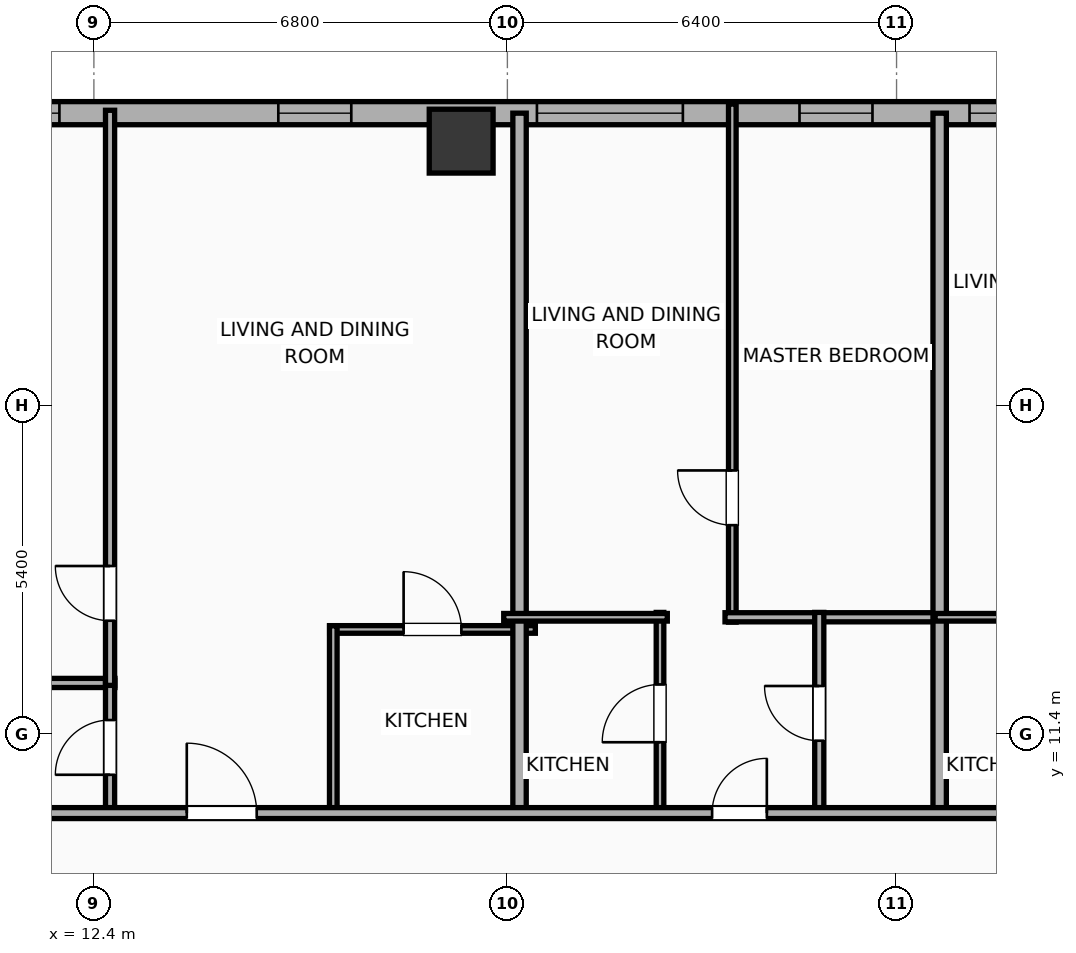
"""IFC4 building model, lengths in metres.
Left out: names, types, materials, properties, quantities, classifications, styles, units other than length and angle.
Written with IfcOpenShell. Run it as: python <this file> out.ifc"""

import sys

from ifc_helpers import new_model, si_unit, direction, frame, frame_2d, origin, origin_2d, place, context, subcontext, project, spatial, rectangle, hollow_rectangle, extrude, element, fill, save


model = new_model("IFC4")
c1 = context("Model", 3, precision=1e-05, world=origin(), true_north=direction((0.0, 1.0)))
c2 = subcontext(c1, "Body", "Model", "MODEL_VIEW")
j1 = project(units=[si_unit("LENGTHUNIT", "METRE"), si_unit("PLANEANGLEUNIT", "RADIAN")], contexts=[c1])
p1 = place(None, origin())
s1 = spatial("IfcSite", under=j1, at=p1, CompositionType="ELEMENT")
p2 = place(p1, origin())
s2 = spatial("IfcBuilding", under=s1, at=p2, CompositionType="ELEMENT")
p3 = place(p2, frame((0.0, 0.0, 97.5)))
s3 = spatial("IfcBuildingStorey", under=s2, at=p3, CompositionType="ELEMENT", Elevation=97.5)
p4 = place(p3, frame((18.44, 21.15, 0.0), z_axis=(0.0, 0.0, 1.0), x_axis=(1.0, 0.0, 0.0)))
e1 = element("IfcColumn", 1, at=p4, inside=s3, PredefinedType="COLUMN", context=c2, shape_type="SweptSolid", body=[
    extrude(hollow_rectangle(XDim=1.05, YDim=1.05, WallThickness=0.036, at=origin_2d()), origin(), (0.0, 0.0, 1.0), 3.9),
])
p5 = place(p3, frame((-25.381, 21.61, 0.0), z_axis=(0.0, 0.0, 1.0), x_axis=(1.0, 0.0, 0.0)))
e2 = element("IfcWall", 2, at=p5, inside=s3, PredefinedType="ELEMENTEDWALL", context=c2, shape_type="SweptSolid", body=[
    extrude(rectangle(XDim=54.763, YDim=0.38, at=frame_2d((27.381, 0.0))), origin(), (0.0, 0.0, 1.0), 3.65),
])
p6 = place(p5, frame((45.067, 0.0, 0.75)))
e3 = element("IfcOpeningElement", 3, at=p6, cuts=e2, PredefinedType="OPENING", context=c2, shape_type="SweptSolid", body=[
    extrude(rectangle(XDim=2.4, YDim=2.1, at=frame_2d((1.2, 1.05))), frame((0.0, 0.2, 0.0), z_axis=(0.0, -1.0, 0.0), x_axis=(1.0, 0.0, 0.0)), (0.0, 0.0, 1.0), 0.4),
])
p7 = place(p5, frame((4.076, 0.0, 0.75)))
e4 = element("IfcOpeningElement", 4, at=p7, cuts=e2, PredefinedType="OPENING", context=c2, shape_type="SweptSolid", body=[
    extrude(rectangle(XDim=1.2, YDim=2.05, at=frame_2d((0.6, 1.025))), frame((0.0, 0.2, 0.0), z_axis=(0.0, -1.0, 0.0), x_axis=(1.0, 0.0, 0.0)), (0.0, 0.0, 1.0), 0.4),
])
p8 = place(p5, frame((9.395, 0.0, 0.75)))
e5 = element("IfcOpeningElement", 5, at=p8, cuts=e2, PredefinedType="OPENING", context=c2, shape_type="SweptSolid", body=[
    extrude(rectangle(XDim=0.85, YDim=2.05, at=frame_2d((0.425, 1.025))), frame((0.0, 0.2, 0.0), z_axis=(0.0, -1.0, 0.0), x_axis=(1.0, 0.0, 0.0)), (0.0, 0.0, 1.0), 0.4),
])
p9 = place(p5, frame((7.205, 0.0, 0.75)))
e6 = element("IfcOpeningElement", 6, at=p9, cuts=e2, PredefinedType="OPENING", context=c2, shape_type="SweptSolid", body=[
    extrude(rectangle(XDim=1.2, YDim=2.05, at=frame_2d((0.6, 1.025))), frame((0.0, 0.2, 0.0), z_axis=(0.0, -1.0, 0.0), x_axis=(1.0, 0.0, 0.0)), (0.0, 0.0, 1.0), 0.4),
])
p10 = place(p5, frame((13.676, 0.0, 0.75)))
e7 = element("IfcOpeningElement", 7, at=p10, cuts=e2, PredefinedType="OPENING", context=c2, shape_type="SweptSolid", body=[
    extrude(rectangle(XDim=1.2, YDim=2.05, at=frame_2d((0.6, 1.025))), frame((0.0, 0.2, 0.0), z_axis=(0.0, -1.0, 0.0), x_axis=(1.0, 0.0, 0.0)), (0.0, 0.0, 1.0), 0.4),
])
p11 = place(p5, frame((17.136, 0.0, 0.75)))
e8 = element("IfcOpeningElement", 8, at=p11, cuts=e2, PredefinedType="OPENING", context=c2, shape_type="SweptSolid", body=[
    extrude(rectangle(XDim=1.2, YDim=2.05, at=frame_2d((0.6, 1.025))), frame((0.0, 0.2, 0.0), z_axis=(0.0, -1.0, 0.0), x_axis=(1.0, 0.0, 0.0)), (0.0, 0.0, 1.0), 0.4),
])
p12 = place(p5, frame((22.656, 0.0, 0.75)))
e9 = element("IfcOpeningElement", 9, at=p12, cuts=e2, PredefinedType="OPENING", context=c2, shape_type="SweptSolid", body=[
    extrude(rectangle(XDim=1.2, YDim=2.05, at=frame_2d((0.6, 1.025))), frame((0.0, 0.2, 0.0), z_axis=(0.0, -1.0, 0.0), x_axis=(1.0, 0.0, 0.0)), (0.0, 0.0, 1.0), 0.4),
])
p13 = place(p5, frame((29.443, 0.0, 0.75)))
e10 = element("IfcOpeningElement", 10, at=p13, cuts=e2, PredefinedType="OPENING", context=c2, shape_type="SweptSolid", body=[
    extrude(rectangle(XDim=1.2, YDim=2.05, at=frame_2d((0.6, 1.025))), frame((0.0, 0.2, 0.0), z_axis=(0.0, -1.0, 0.0), x_axis=(1.0, 0.0, 0.0)), (0.0, 0.0, 1.0), 0.4),
])
p14 = place(p5, frame((26.348, 0.0, 0.75)))
e11 = element("IfcOpeningElement", 11, at=p14, cuts=e2, PredefinedType="OPENING", context=c2, shape_type="SweptSolid", body=[
    extrude(rectangle(XDim=1.2, YDim=2.05, at=frame_2d((0.6, 1.025))), frame((0.0, 0.2, 0.0), z_axis=(0.0, -1.0, 0.0), x_axis=(1.0, 0.0, 0.0)), (0.0, 0.0, 1.0), 0.4),
])
p15 = place(p5, frame((33.596, 0.0, 0.75)))
e12 = element("IfcOpeningElement", 12, at=p15, cuts=e2, PredefinedType="OPENING", context=c2, shape_type="SweptSolid", body=[
    extrude(rectangle(XDim=1.2, YDim=2.05, at=frame_2d((0.6, 1.025))), frame((0.0, 0.2, 0.0), z_axis=(0.0, -1.0, 0.0), x_axis=(1.0, 0.0, 0.0)), (0.0, 0.0, 1.0), 0.4),
])
p16 = place(p5, frame((36.014, 0.0, 0.75)))
e13 = element("IfcOpeningElement", 13, at=p16, cuts=e2, PredefinedType="OPENING", context=c2, shape_type="SweptSolid", body=[
    extrude(rectangle(XDim=1.2, YDim=2.05, at=frame_2d((0.6, 1.025))), frame((0.0, 0.2, 0.0), z_axis=(0.0, -1.0, 0.0), x_axis=(1.0, 0.0, 0.0)), (0.0, 0.0, 1.0), 0.4),
])
p17 = place(p5, frame((40.814, 0.0, 0.75)))
e14 = element("IfcOpeningElement", 14, at=p17, cuts=e2, PredefinedType="OPENING", context=c2, shape_type="SweptSolid", body=[
    extrude(rectangle(XDim=1.2, YDim=2.05, at=frame_2d((0.6, 1.025))), frame((0.0, 0.2, 0.0), z_axis=(0.0, -1.0, 0.0), x_axis=(1.0, 0.0, 0.0)), (0.0, 0.0, 1.0), 0.4),
])
p18 = place(p5, frame((49.385, 0.0, 0.75)))
e15 = element("IfcOpeningElement", 15, at=p18, cuts=e2, PredefinedType="OPENING", context=c2, shape_type="SweptSolid", body=[
    extrude(rectangle(XDim=1.2, YDim=2.05, at=frame_2d((0.6, 1.025))), frame((0.0, 0.2, 0.0), z_axis=(0.0, -1.0, 0.0), x_axis=(1.0, 0.0, 0.0)), (0.0, 0.0, 1.0), 0.4),
])
p19 = place(p5, frame((52.181, 0.0, 0.75)))
e16 = element("IfcOpeningElement", 16, at=p19, cuts=e2, PredefinedType="OPENING", context=c2, shape_type="SweptSolid", body=[
    extrude(rectangle(XDim=1.2, YDim=2.05, at=frame_2d((0.6, 1.025))), frame((0.0, 0.2, 0.0), z_axis=(0.0, -1.0, 0.0), x_axis=(1.0, 0.0, 0.0)), (0.0, 0.0, 1.0), 0.4),
])
p20 = place(p3, frame((9.54, 12.24, 0.0), z_axis=(0.0, 0.0, 1.0), x_axis=(1.0, 0.0, 0.0)))
e17 = element("IfcWall", 17, at=p20, inside=s3, PredefinedType="PLUMBINGWALL", context=c2, shape_type="SweptSolid", body=[
    extrude(rectangle(XDim=3.206, YDim=0.15, at=frame_2d((1.603, 0.0))), origin(), (0.0, 0.0, 1.0), 3.65),
])
p21 = place(p3, frame((12.666, 10.08, 0.0), z_axis=(0.0, 0.0, 1.0), x_axis=(0.0, 1.0, 0.0)))
e18 = element("IfcWall", 18, at=p21, inside=s3, PredefinedType="PLUMBINGWALL", context=c2, shape_type="SweptSolid", body=[
    extrude(rectangle(XDim=2.2, YDim=0.15, at=frame_2d((1.1, 0.0))), origin(), (0.0, 0.0, 1.0), 3.65),
])
p22 = place(p21, frame((0.65, 0.0, 0.0)))
e19 = element("IfcOpeningElement", 19, at=p22, cuts=e18, PredefinedType="OPENING", context=c2, shape_type="SweptSolid", body=[
    extrude(rectangle(XDim=0.9, YDim=2.05, at=frame_2d((0.45, 1.025))), frame((0.0, 0.085, 0.0), z_axis=(0.0, -1.0, 0.0), x_axis=(1.0, 0.0, 0.0)), (0.0, 0.0, 1.0), 0.17),
])
p23 = place(p3, frame((12.666, 12.2, 0.0), z_axis=(0.0, 0.0, 1.0), x_axis=(0.0, 1.0, 0.0)))
e20 = element("IfcWall", 20, at=p23, inside=s3, PredefinedType="PLUMBINGWALL", context=c2, shape_type="SweptSolid", body=[
    extrude(rectangle(XDim=9.458, YDim=0.15, at=frame_2d((4.729, 0.0))), origin(), (0.0, 0.0, 1.0), 3.65),
])
p24 = place(p23, frame((1.063, 0.0, 0.0)))
e21 = element("IfcOpeningElement", 21, at=p24, cuts=e20, PredefinedType="OPENING", context=c2, shape_type="SweptSolid", body=[
    extrude(rectangle(XDim=0.9, YDim=2.05, at=frame_2d((0.45, 1.025))), frame((0.0, 0.085, 0.0), z_axis=(0.0, -1.0, 0.0), x_axis=(1.0, 0.0, 0.0)), (0.0, 0.0, 1.0), 0.17),
])
p25 = place(p3, frame((16.277, 13.12, 0.0), z_axis=(0.0, 0.0, 1.0), x_axis=(1.0, 0.0, 0.0)))
e22 = element("IfcWall", 22, at=p25, inside=s3, PredefinedType="PARTITIONING", context=c2, shape_type="SweptSolid", body=[
    extrude(rectangle(XDim=3.383, YDim=0.125, at=frame_2d((1.691, 0.0))), origin(), (0.0, 0.0, 1.0), 3.65),
])
p26 = place(p25, frame((1.217, 0.0, 0.0)))
e23 = element("IfcOpeningElement", 23, at=p26, cuts=e22, PredefinedType="OPENING", context=c2, shape_type="SweptSolid", body=[
    extrude(rectangle(XDim=0.95, YDim=2.05, at=frame_2d((0.475, 1.025))), frame((0.0, 0.073, 0.0), z_axis=(0.0, -1.0, 0.0), x_axis=(1.0, 0.0, 0.0)), (0.0, 0.0, 1.0), 0.145),
])
p27 = place(p3, frame((16.337, 10.08, 0.0), z_axis=(0.0, 0.0, 1.0), x_axis=(0.0, 1.0, 0.0)))
e24 = element("IfcWall", 24, at=p27, inside=s3, PredefinedType="PARTITIONING", context=c2, shape_type="SweptSolid", body=[
    extrude(rectangle(XDim=3.1, YDim=0.125, at=frame_2d((1.55, 0.0))), origin(), (0.0, 0.0, 1.0), 3.65),
])
p28 = place(p3, frame((19.4, 10.02, 0.0), z_axis=(0.0, 0.0, 1.0), x_axis=(0.0, 1.0, 0.0)))
e25 = element("IfcWall", 25, at=p28, inside=s3, PredefinedType="PARTITIONING", context=c2, shape_type="SweptSolid", body=[
    extrude(rectangle(XDim=11.59, YDim=0.22, at=frame_2d((5.795, 0.0))), origin(), (0.0, 0.0, 1.0), 3.65),
])
p29 = place(p3, frame((22.899, 13.24, 0.0), z_axis=(0.0, 0.0, 1.0), x_axis=(0.0, 1.0, 0.0)))
e26 = element("IfcWall", 26, at=p29, inside=s3, PredefinedType="PARTITIONING", context=c2, shape_type="SweptSolid", body=[
    extrude(rectangle(XDim=8.52, YDim=0.125, at=frame_2d((4.26, 0.0))), origin(), (0.0, 0.0, 1.0), 3.65),
])
p30 = place(p29, frame((1.595, 0.0, 0.0)))
e27 = element("IfcOpeningElement", 27, at=p30, cuts=e26, PredefinedType="OPENING", context=c2, shape_type="SweptSolid", body=[
    extrude(rectangle(XDim=0.9, YDim=2.05, at=frame_2d((0.45, 1.025))), frame((0.0, 0.073, 0.0), z_axis=(0.0, -1.0, 0.0), x_axis=(1.0, 0.0, 0.0)), (0.0, 0.0, 1.0), 0.145),
])
p31 = place(p3, frame((22.779, 13.32, 0.0), z_axis=(0.0, 0.0, 1.0), x_axis=(1.0, 0.0, 0.0)))
e28 = element("IfcWall", 28, at=p31, inside=s3, PredefinedType="PLUMBINGWALL", context=c2, shape_type="SweptSolid", body=[
    extrude(rectangle(XDim=3.605, YDim=0.15, at=frame_2d((1.802, 0.0))), origin(), (0.0, 0.0, 1.0), 3.65),
])
p32 = place(p3, frame((21.71, 10.08, 0.0), z_axis=(0.0, 0.0, 1.0), x_axis=(0.0, 1.0, 0.0)))
e29 = element("IfcWall", 29, at=p32, inside=s3, PredefinedType="PARTITIONING", context=c2, shape_type="SweptSolid", body=[
    extrude(rectangle(XDim=3.32, YDim=0.125, at=frame_2d((1.66, 0.0))), origin(), (0.0, 0.0, 1.0), 3.65),
])
p33 = place(p32, frame((1.185, 0.0, 0.0)))
e30 = element("IfcOpeningElement", 30, at=p33, cuts=e29, PredefinedType="OPENING", context=c2, shape_type="SweptSolid", body=[
    extrude(rectangle(XDim=0.95, YDim=2.05, at=frame_2d((0.475, 1.025))), frame((0.0, 0.073, 0.0), z_axis=(0.0, -1.0, 0.0), x_axis=(1.0, 0.0, 0.0)), (0.0, 0.0, 1.0), 0.145),
])
p34 = place(p3, frame((19.14, 13.32, 0.0), z_axis=(0.0, 0.0, 1.0), x_axis=(1.0, 0.0, 0.0)))
e31 = element("IfcWall", 31, at=p34, inside=s3, PredefinedType="PARTITIONING", context=c2, shape_type="SweptSolid", body=[
    extrude(rectangle(XDim=2.69, YDim=0.125, at=frame_2d((1.345, 0.0))), origin(), (0.0, 0.0, 1.0), 3.65),
])
p35 = place(p3, frame((24.329, 10.08, 0.0), z_axis=(0.0, 0.0, 1.0), x_axis=(0.0, 1.0, 0.0)))
e32 = element("IfcWall", 32, at=p35, inside=s3, PredefinedType="PLUMBINGWALL", context=c2, shape_type="SweptSolid", body=[
    extrude(rectangle(XDim=3.32, YDim=0.15, at=frame_2d((1.66, 0.0))), origin(), (0.0, 0.0, 1.0), 3.65),
])
p36 = place(p35, frame((1.21, 0.0, 0.0)))
e33 = element("IfcOpeningElement", 33, at=p36, cuts=e32, PredefinedType="OPENING", context=c2, shape_type="SweptSolid", body=[
    extrude(rectangle(XDim=0.9, YDim=2.05, at=frame_2d((0.45, 1.025))), frame((0.0, 0.085, 0.0), z_axis=(0.0, -1.0, 0.0), x_axis=(1.0, 0.0, 0.0)), (0.0, 0.0, 1.0), 0.17),
])
p37 = place(p3, frame((26.309, 10.02, 0.0), z_axis=(0.0, 0.0, 1.0), x_axis=(0.0, 1.0, 0.0)))
e34 = element("IfcWall", 34, at=p37, inside=s3, PredefinedType="PARTITIONING", context=c2, shape_type="SweptSolid", body=[
    extrude(rectangle(XDim=11.59, YDim=0.22, at=frame_2d((5.795, 0.0))), origin(), (0.0, 0.0, 1.0), 3.65),
])
p38 = place(p3, frame((26.234, 13.32, 0.0), z_axis=(0.0, 0.0, 1.0), x_axis=(1.0, 0.0, 0.0)))
e35 = element("IfcWall", 35, at=p38, inside=s3, PredefinedType="PARTITIONING", context=c2, shape_type="SweptSolid", body=[
    extrude(rectangle(XDim=2.505, YDim=0.125, at=frame_2d((1.252, 0.0))), origin(), (0.0, 0.0, 1.0), 3.65),
])
p39 = place(p3, frame((-29.21, 10.1, 0.0), z_axis=(0.0, 0.0, 1.0), x_axis=(1.0, 0.0, 0.0)))
e36 = element("IfcWall", 36, at=p39, inside=s3, PredefinedType="PARTITIONING", context=c2, shape_type="SweptSolid", body=[
    extrude(rectangle(XDim=62.42, YDim=0.18, at=frame_2d((31.21, 0.0))), origin(), (0.0, 0.0, 1.0), 3.65),
])
p40 = place(p39, frame((4.906, 0.0, 0.0)))
e37 = element("IfcOpeningElement", 37, at=p40, cuts=e36, PredefinedType="OPENING", context=c2, shape_type="SweptSolid", body=[
    extrude(rectangle(XDim=1.15, YDim=2.05, at=frame_2d((0.575, 1.025))), frame((0.0, 0.1, 0.0), z_axis=(0.0, -1.0, 0.0), x_axis=(1.0, 0.0, 0.0)), (0.0, 0.0, 1.0), 0.2),
])
p41 = place(p39, frame((14.812, 0.0, 0.0)))
e38 = element("IfcOpeningElement", 38, at=p41, cuts=e36, PredefinedType="OPENING", context=c2, shape_type="SweptSolid", body=[
    extrude(rectangle(XDim=1.15, YDim=2.05, at=frame_2d((0.575, 1.025))), frame((0.0, 0.1, 0.0), z_axis=(0.0, -1.0, 0.0), x_axis=(1.0, 0.0, 0.0)), (0.0, 0.0, 1.0), 0.2),
])
p42 = place(p39, frame((24.406, 0.0, 0.0)))
e39 = element("IfcOpeningElement", 39, at=p42, cuts=e36, PredefinedType="OPENING", context=c2, shape_type="SweptSolid", body=[
    extrude(rectangle(XDim=1.15, YDim=2.05, at=frame_2d((0.575, 1.025))), frame((0.0, 0.1, 0.0), z_axis=(0.0, -1.0, 0.0), x_axis=(1.0, 0.0, 0.0)), (0.0, 0.0, 1.0), 0.2),
])
p43 = place(p39, frame((33.981, 0.0, 0.0)))
e40 = element("IfcOpeningElement", 40, at=p43, cuts=e36, PredefinedType="OPENING", context=c2, shape_type="SweptSolid", body=[
    extrude(rectangle(XDim=1.15, YDim=2.05, at=frame_2d((0.575, 1.025))), frame((0.0, 0.1, 0.0), z_axis=(0.0, -1.0, 0.0), x_axis=(1.0, 0.0, 0.0)), (0.0, 0.0, 1.0), 0.2),
])
p44 = place(p39, frame((43.138, 0.0, 0.0)))
e41 = element("IfcOpeningElement", 41, at=p44, cuts=e36, PredefinedType="OPENING", context=c2, shape_type="SweptSolid", body=[
    extrude(rectangle(XDim=1.15, YDim=2.05, at=frame_2d((0.575, 1.025))), frame((0.0, 0.1, 0.0), z_axis=(0.0, -1.0, 0.0), x_axis=(1.0, 0.0, 0.0)), (0.0, 0.0, 1.0), 0.2),
])
p45 = place(p39, frame((51.777, 0.0, 0.0)))
e42 = element("IfcOpeningElement", 42, at=p45, cuts=e36, PredefinedType="OPENING", context=c2, shape_type="SweptSolid", body=[
    extrude(rectangle(XDim=0.9, YDim=2.05, at=frame_2d((0.45, 1.025))), frame((0.0, 0.1, 0.0), z_axis=(0.0, -1.0, 0.0), x_axis=(1.0, 0.0, 0.0)), (0.0, 0.0, 1.0), 0.2),
])
p46 = place(p39, frame((58.718, 0.0, 0.0)))
e43 = element("IfcOpeningElement", 43, at=p46, cuts=e36, PredefinedType="OPENING", context=c2, shape_type="SweptSolid", body=[
    extrude(rectangle(XDim=0.9, YDim=2.05, at=frame_2d((0.45, 1.025))), frame((0.0, 0.1, 0.0), z_axis=(0.0, -1.0, 0.0), x_axis=(1.0, 0.0, 0.0)), (0.0, 0.0, 1.0), 0.2),
])
p47 = place(p6, origin())
e44 = element("IfcWindow", 44, at=p47, inside=s3, PartitioningType="SINGLE_PANEL", PredefinedType="WINDOW", context=c2, shape_type="SweptSolid", body=[
    extrude(rectangle(XDim=2.4, YDim=2.1, at=frame_2d((1.2, 1.05))), frame((0.0, 0.03, 0.0), z_axis=(0.0, -1.0, 0.0), x_axis=(1.0, 0.0, 0.0)), (0.0, 0.0, 1.0), 0.06),
])
fill(e3, e44)
p48 = place(p16, origin())
e45 = element("IfcWindow", 45, at=p48, inside=s3, PartitioningType="SINGLE_PANEL", PredefinedType="WINDOW", context=c2, shape_type="SweptSolid", body=[
    extrude(rectangle(XDim=1.2, YDim=2.05, at=frame_2d((0.6, 1.025))), frame((0.0, 0.03, 0.0), z_axis=(0.0, -1.0, 0.0), x_axis=(1.0, 0.0, 0.0)), (0.0, 0.0, 1.0), 0.06),
])
fill(e13, e45)
p49 = place(p17, origin())
e46 = element("IfcWindow", 46, at=p49, inside=s3, PartitioningType="SINGLE_PANEL", PredefinedType="WINDOW", context=c2, shape_type="SweptSolid", body=[
    extrude(rectangle(XDim=1.2, YDim=2.05, at=frame_2d((0.6, 1.025))), frame((0.0, 0.03, 0.0), z_axis=(0.0, -1.0, 0.0), x_axis=(1.0, 0.0, 0.0)), (0.0, 0.0, 1.0), 0.06),
])
fill(e14, e46)
p50 = place(p18, origin())
e47 = element("IfcWindow", 47, at=p50, inside=s3, PartitioningType="SINGLE_PANEL", PredefinedType="WINDOW", context=c2, shape_type="SweptSolid", body=[
    extrude(rectangle(XDim=1.2, YDim=2.05, at=frame_2d((0.6, 1.025))), frame((0.0, 0.03, 0.0), z_axis=(0.0, -1.0, 0.0), x_axis=(1.0, 0.0, 0.0)), (0.0, 0.0, 1.0), 0.06),
])
fill(e15, e47)
p51 = place(p19, origin())
e48 = element("IfcWindow", 48, at=p51, inside=s3, PartitioningType="SINGLE_PANEL", PredefinedType="WINDOW", context=c2, shape_type="SweptSolid", body=[
    extrude(rectangle(XDim=1.2, YDim=2.05, at=frame_2d((0.6, 1.025))), frame((0.0, 0.03, 0.0), z_axis=(0.0, -1.0, 0.0), x_axis=(1.0, 0.0, 0.0)), (0.0, 0.0, 1.0), 0.06),
])
fill(e16, e48)
p52 = place(p22, origin())
e49 = element("IfcDoor", 49, at=p52, inside=s3, OperationType="SINGLE_SWING_LEFT", PredefinedType="DOOR", context=c2, shape_type="SweptSolid", body=[
    extrude(rectangle(XDim=0.9, YDim=2.05, at=frame_2d((0.45, 1.025))), frame((0.0, 0.025, 0.0), z_axis=(0.0, -1.0, 0.0), x_axis=(1.0, 0.0, 0.0)), (0.0, 0.0, 1.0), 0.05),
])
fill(e19, e49)
p53 = place(p24, origin())
e50 = element("IfcDoor", 50, at=p53, inside=s3, OperationType="SINGLE_SWING_RIGHT", PredefinedType="DOOR", context=c2, shape_type="SweptSolid", body=[
    extrude(rectangle(XDim=0.9, YDim=2.05, at=frame_2d((0.45, 1.025))), frame((0.0, 0.025, 0.0), z_axis=(0.0, -1.0, 0.0), x_axis=(1.0, 0.0, 0.0)), (0.0, 0.0, 1.0), 0.05),
])
fill(e21, e50)
p54 = place(p26, origin())
e51 = element("IfcDoor", 51, at=p54, inside=s3, OperationType="SINGLE_SWING_LEFT", PredefinedType="DOOR", context=c2, shape_type="SweptSolid", body=[
    extrude(rectangle(XDim=0.95, YDim=2.05, at=frame_2d((0.475, 1.025))), frame((0.0, 0.025, 0.0), z_axis=(0.0, -1.0, 0.0), x_axis=(1.0, 0.0, 0.0)), (0.0, 0.0, 1.0), 0.05),
])
fill(e23, e51)
p55 = place(p30, origin())
e52 = element("IfcDoor", 52, at=p55, inside=s3, OperationType="SINGLE_SWING_RIGHT", PredefinedType="DOOR", context=c2, shape_type="SweptSolid", body=[
    extrude(rectangle(XDim=0.9, YDim=2.05, at=frame_2d((0.45, 1.025))), frame((0.0, 0.025, 0.0), z_axis=(0.0, -1.0, 0.0), x_axis=(1.0, 0.0, 0.0)), (0.0, 0.0, 1.0), 0.05),
])
fill(e27, e52)
p56 = place(p33, origin())
e53 = element("IfcDoor", 53, at=p56, inside=s3, OperationType="SINGLE_SWING_LEFT", PredefinedType="DOOR", context=c2, shape_type="SweptSolid", body=[
    extrude(rectangle(XDim=0.95, YDim=2.05, at=frame_2d((0.475, 1.025))), frame((0.0, 0.025, 0.0), z_axis=(0.0, -1.0, 0.0), x_axis=(1.0, 0.0, 0.0)), (0.0, 0.0, 1.0), 0.05),
])
fill(e30, e53)
p57 = place(p36, origin())
e54 = element("IfcDoor", 54, at=p57, inside=s3, OperationType="SINGLE_SWING_RIGHT", PredefinedType="DOOR", context=c2, shape_type="SweptSolid", body=[
    extrude(rectangle(XDim=0.9, YDim=2.05, at=frame_2d((0.45, 1.025))), frame((0.0, 0.025, 0.0), z_axis=(0.0, -1.0, 0.0), x_axis=(1.0, 0.0, 0.0)), (0.0, 0.0, 1.0), 0.05),
])
fill(e33, e54)
p58 = place(p44, origin())
e55 = element("IfcDoor", 55, at=p58, inside=s3, OperationType="SINGLE_SWING_LEFT", PredefinedType="DOOR", context=c2, shape_type="SweptSolid", body=[
    extrude(rectangle(XDim=1.15, YDim=2.05, at=frame_2d((0.575, 1.025))), frame((0.0, 0.025, 0.0), z_axis=(0.0, -1.0, 0.0), x_axis=(1.0, 0.0, 0.0)), (0.0, 0.0, 1.0), 0.05),
])
fill(e41, e55)
p59 = place(p45, origin())
e56 = element("IfcDoor", 56, at=p59, inside=s3, OperationType="SINGLE_SWING_RIGHT", PredefinedType="DOOR", context=c2, shape_type="SweptSolid", body=[
    extrude(rectangle(XDim=0.9, YDim=2.05, at=frame_2d((0.45, 1.025))), frame((0.0, 0.025, 0.0), z_axis=(0.0, -1.0, 0.0), x_axis=(1.0, 0.0, 0.0)), (0.0, 0.0, 1.0), 0.05),
])
fill(e42, e56)
save(model, sys.argv[1])
